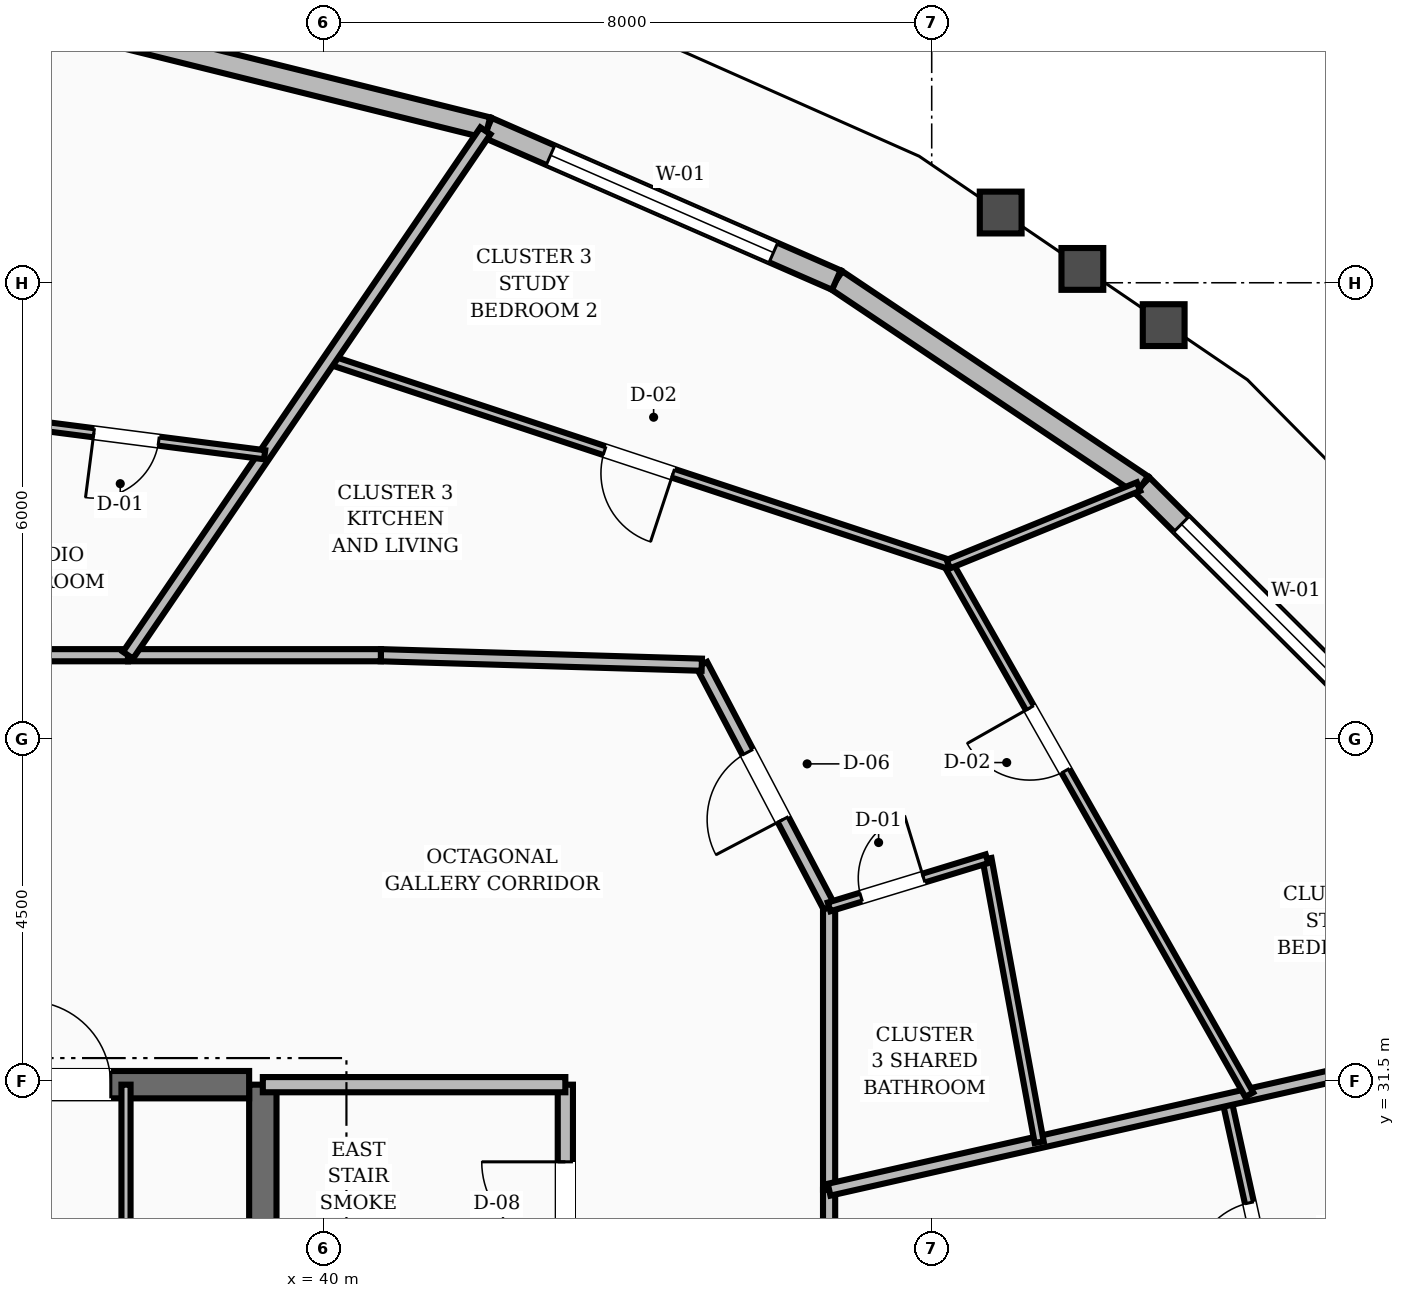
"""IFC4 building model, lengths in metres.
Left out: names, types, materials, properties, quantities, classifications, styles, units other than length and angle.
Written with IfcOpenShell. Run it as: python <this file> out.ifc"""

import sys

from ifc_helpers import new_model, si_unit, direction, frame, frame_2d, origin, place, context, subcontext, project, spatial, rectangle, extrude, element, fill, save


model = new_model("IFC4")
c1 = context("Model", 3, precision=1e-05, world=origin(), true_north=direction((0.0, 1.0)))
c2 = subcontext(c1, "Body", "Model", "MODEL_VIEW")
j1 = project(units=[si_unit("LENGTHUNIT", "METRE"), si_unit("PLANEANGLEUNIT", "RADIAN")], contexts=[c1])
p1 = place(None, origin())
s1 = spatial("IfcSite", under=j1, at=p1, CompositionType="ELEMENT")
p2 = place(p1, origin())
s2 = spatial("IfcBuilding", under=s1, at=p2, CompositionType="ELEMENT")
p3 = place(p2, frame((0.0, 0.0, 135.2)))
s3 = spatial("IfcBuildingStorey", under=s2, at=p3, CompositionType="ELEMENT", Elevation=135.2)
p4 = place(p3, frame((39.2, 25.15, 0.0), z_axis=(0.0, 0.0, 1.0), x_axis=(0.0, 1.0, 0.0)))
e1 = element("IfcWall", 1, at=p4, inside=s3, PredefinedType="SHEAR", context=c2, shape_type="SweptSolid", body=[
    extrude(rectangle(XDim=6.3, YDim=0.36, at=frame_2d((3.15, 0.0))), origin(), (0.0, 0.0, 1.0), 3.6),
])
p5 = place(p3, frame((35.8, 31.45, 0.0), z_axis=(0.0, 0.0, 1.0), x_axis=(1.0, 0.0, 0.0)))
e2 = element("IfcWall", 2, at=p5, inside=s3, PredefinedType="SHEAR", context=c2, shape_type="SweptSolid", body=[
    extrude(rectangle(XDim=3.22, YDim=0.36, at=frame_2d((1.61, 0.0))), origin(), (0.0, 0.0, 1.0), 3.6),
])
p6 = place(p5, frame((0.3, 0.0, 0.0)))
e3 = element("IfcOpeningElement", 3, at=p6, cuts=e2, PredefinedType="OPENING", context=c2, shape_type="SweptSolid", body=[
    extrude(rectangle(XDim=1.1, YDim=2.1, at=frame_2d((0.55, 1.05))), frame((0.0, 0.19, 0.0), z_axis=(0.0, -1.0, 0.0), x_axis=(1.0, 0.0, 0.0)), (0.0, 0.0, 1.0), 0.38),
])
p7 = place(p3, frame((54.068, 36.051, 0.0), z_axis=(0.0, 0.0, 1.0), x_axis=(-0.708572716766, 0.705637800188, 0.0)))
e4 = element("IfcWall", 4, at=p7, inside=s3, PredefinedType="STANDARD", context=c2, shape_type="SweptSolid", body=[
    extrude(rectangle(XDim=4.658, YDim=0.28, at=frame_2d((2.329, 0.0))), origin(), (0.0, 0.0, 1.0), 2.82),
])
p8 = place(p7, frame((0.729, 0.0, 0.8)))
e5 = element("IfcOpeningElement", 5, at=p8, cuts=e4, PredefinedType="OPENING", context=c2, shape_type="SweptSolid", body=[
    extrude(rectangle(XDim=3.2, YDim=1.65, at=frame_2d((1.6, 0.825))), frame((0.0, 0.15, 0.0), z_axis=(0.0, -1.0, 0.0), x_axis=(1.0, 0.0, 0.0)), (0.0, 0.0, 1.0), 0.3),
])
p9 = place(p3, frame((50.768, 39.338, 0.0), z_axis=(0.0, 0.0, 1.0), x_axis=(-0.830503660309, 0.557013168797, 0.0)))
e6 = element("IfcWall", 6, at=p9, inside=s3, PredefinedType="STANDARD", context=c2, shape_type="SweptSolid", body=[
    extrude(rectangle(XDim=4.843, YDim=0.28, at=frame_2d((2.421, 0.0))), origin(), (0.0, 0.0, 1.0), 2.82),
])
p10 = place(p3, frame((46.746, 42.035, 0.0), z_axis=(0.0, 0.0, 1.0), x_axis=(-0.916386582237, 0.400294431507, 0.0)))
e7 = element("IfcWall", 7, at=p10, inside=s3, PredefinedType="STANDARD", context=c2, shape_type="SweptSolid", body=[
    extrude(rectangle(XDim=5.007, YDim=0.28, at=frame_2d((2.504, 0.0))), origin(), (0.0, 0.0, 1.0), 2.82),
])
p11 = place(p10, frame((0.904, 0.0, 0.8)))
e8 = element("IfcOpeningElement", 8, at=p11, cuts=e7, PredefinedType="OPENING", context=c2, shape_type="SweptSolid", body=[
    extrude(rectangle(XDim=3.2, YDim=1.65, at=frame_2d((1.6, 0.825))), frame((0.0, 0.15, 0.0), z_axis=(0.0, -1.0, 0.0), x_axis=(1.0, 0.0, 0.0)), (0.0, 0.0, 1.0), 0.3),
])
p12 = place(p3, frame((42.157, 44.04, 0.0), z_axis=(0.0, 0.0, 1.0), x_axis=(-0.970616564694, 0.240631428415, 0.0)))
e9 = element("IfcWall", 9, at=p12, inside=s3, PredefinedType="STANDARD", context=c2, shape_type="SweptSolid", body=[
    extrude(rectangle(XDim=5.13, YDim=0.28, at=frame_2d((2.565, 0.0))), origin(), (0.0, 0.0, 1.0), 2.82),
])
p13 = place(p3, frame((43.18, 28.32, 0.0), z_axis=(0.0, 0.0, 1.0), x_axis=(0.0, 1.0, 0.0)))
e10 = element("IfcWall", 10, at=p13, inside=s3, PredefinedType="SOLIDWALL", context=c2, shape_type="SweptSolid", body=[
    extrude(rectangle(XDim=3.13, YDim=0.2, at=frame_2d((1.565, 0.0))), origin(), (0.0, 0.0, 1.0), 2.8),
])
p14 = place(p13, frame((1.015, 0.0, 0.0)))
e11 = element("IfcOpeningElement", 11, at=p14, cuts=e10, PredefinedType="OPENING", context=c2, shape_type="SweptSolid", body=[
    extrude(rectangle(XDim=1.1, YDim=2.1, at=frame_2d((0.55, 1.05))), frame((0.0, 0.11, 0.0), z_axis=(0.0, -1.0, 0.0), x_axis=(1.0, 0.0, 0.0)), (0.0, 0.0, 1.0), 0.22),
])
p15 = place(p3, frame((39.2, 31.45, 0.0), z_axis=(0.0, 0.0, 1.0), x_axis=(1.0, 0.0, 0.0)))
e12 = element("IfcWall", 12, at=p15, inside=s3, PredefinedType="SOLIDWALL", context=c2, shape_type="SweptSolid", body=[
    extrude(rectangle(XDim=3.98, YDim=0.2, at=frame_2d((1.99, 0.0))), origin(), (0.0, 0.0, 1.0), 2.8),
])
p16 = place(p3, frame((37.4, 25.25, 0.0), z_axis=(0.0, 0.0, 1.0), x_axis=(0.0, 1.0, 0.0)))
e13 = element("IfcWall", 13, at=p16, inside=s3, PredefinedType="PARTITIONING", context=c2, shape_type="SweptSolid", body=[
    extrude(rectangle(XDim=6.2, YDim=0.12, at=frame_2d((3.1, 0.0))), origin(), (0.0, 0.0, 1.0), 2.8),
])
p17 = place(p16, frame((2.625, 0.0, 0.0)))
e14 = element("IfcOpeningElement", 14, at=p17, cuts=e13, PredefinedType="OPENING", context=c2, shape_type="SweptSolid", body=[
    extrude(rectangle(XDim=0.95, YDim=2.1, at=frame_2d((0.475, 1.05))), frame((0.0, 0.07, 0.0), z_axis=(0.0, -1.0, 0.0), x_axis=(1.0, 0.0, 0.0)), (0.0, 0.0, 1.0), 0.14),
])
p18 = place(p3, frame((46.65, 26.914, 0.0), z_axis=(0.0, 0.0, 1.0), x_axis=(0.0, 1.0, 0.0)))
e15 = element("IfcWall", 15, at=p18, inside=s3, PredefinedType="SOLIDWALL", context=c2, shape_type="SweptSolid", body=[
    extrude(rectangle(XDim=3.154, YDim=0.16, at=frame_2d((1.577, 0.0))), origin(), (0.0, 0.0, 1.0), 2.8),
])
p19 = place(p3, frame((46.65, 30.068, 0.0), z_axis=(0.0, 0.0, 1.0), x_axis=(0.0, 1.0, 0.0)))
e16 = element("IfcWall", 16, at=p19, inside=s3, PredefinedType="SOLIDWALL", context=c2, shape_type="SweptSolid", body=[
    extrude(rectangle(XDim=3.721, YDim=0.16, at=frame_2d((1.86, 0.0))), origin(), (0.0, 0.0, 1.0), 2.8),
])
p20 = place(p3, frame((46.65, 33.789, 0.0), z_axis=(0.0, 0.0, 1.0), x_axis=(-0.46527115782, 0.885168204185, 0.0)))
e17 = element("IfcWall", 17, at=p20, inside=s3, PredefinedType="SOLIDWALL", context=c2, shape_type="SweptSolid", body=[
    extrude(rectangle(XDim=3.6, YDim=0.16, at=frame_2d((1.8, 0.0))), origin(), (0.0, 0.0, 1.0), 2.8),
])
p21 = place(p20, frame((1.3, 0.0, 0.0)))
e18 = element("IfcOpeningElement", 18, at=p21, cuts=e17, PredefinedType="OPENING", context=c2, shape_type="SweptSolid", body=[
    extrude(rectangle(XDim=1.0, YDim=2.1, at=frame_2d((0.5, 1.05))), frame((0.0, 0.09, 0.0), z_axis=(0.0, -1.0, 0.0), x_axis=(1.0, 0.0, 0.0)), (0.0, 0.0, 1.0), 0.18),
])
p22 = place(p3, frame((44.975, 36.975, 0.0), z_axis=(0.0, 0.0, 1.0), x_axis=(-0.999561990195, 0.029594387265, 0.0)))
e19 = element("IfcWall", 19, at=p22, inside=s3, PredefinedType="SOLIDWALL", context=c2, shape_type="SweptSolid", body=[
    extrude(rectangle(XDim=4.224, YDim=0.16, at=frame_2d((2.112, 0.0))), origin(), (0.0, 0.0, 1.0), 2.8),
])
p23 = place(p3, frame((40.753, 37.1, 0.0), z_axis=(0.0, 0.0, 1.0), x_axis=(-1.0, 0.0, 0.0)))
e20 = element("IfcWall", 20, at=p23, inside=s3, PredefinedType="SOLIDWALL", context=c2, shape_type="SweptSolid", body=[
    extrude(rectangle(XDim=3.327, YDim=0.16, at=frame_2d((1.664, 0.0))), origin(), (0.0, 0.0, 1.0), 2.8),
])
p24 = place(p3, frame((37.426, 37.1, 0.0), z_axis=(0.0, 0.0, 1.0), x_axis=(-1.0, 0.0, 0.0)))
e21 = element("IfcWall", 21, at=p24, inside=s3, PredefinedType="SOLIDWALL", context=c2, shape_type="SweptSolid", body=[
    extrude(rectangle(XDim=2.821, YDim=0.16, at=frame_2d((1.41, 0.0))), origin(), (0.0, 0.0, 1.0), 2.8),
])
p25 = place(p3, frame((52.682, 27.612, 0.0), z_axis=(0.0, 0.0, 1.0), x_axis=(-0.214841783998, 0.976648866199, 0.0)))
e22 = element("IfcWall", 22, at=p25, inside=s3, PredefinedType="PARTITIONING", context=c2, shape_type="SweptSolid", body=[
    extrude(rectangle(XDim=3.726, YDim=0.12, at=frame_2d((1.863, 0.0))), origin(), (0.0, 0.0, 1.0), 2.8),
])
p26 = place(p25, frame((1.388, 0.0, 0.0)))
e23 = element("IfcOpeningElement", 23, at=p26, cuts=e22, PredefinedType="OPENING", context=c2, shape_type="SweptSolid", body=[
    extrude(rectangle(XDim=0.95, YDim=2.1, at=frame_2d((0.475, 1.05))), frame((0.0, 0.07, 0.0), z_axis=(0.0, -1.0, 0.0), x_axis=(1.0, 0.0, 0.0)), (0.0, 0.0, 1.0), 0.14),
])
p27 = place(p3, frame((46.65, 30.068, 0.0), z_axis=(0.0, 0.0, 1.0), x_axis=(0.975360958505, 0.220615050765, 0.0)))
e24 = element("IfcWall", 24, at=p27, inside=s3, PredefinedType="SOLIDWALL", context=c2, shape_type="SweptSolid", body=[
    extrude(rectangle(XDim=10.07, YDim=0.16, at=frame_2d((5.035, 0.0))), origin(), (0.0, 0.0, 1.0), 2.8),
])
p28 = place(p3, frame((49.414, 30.693, 0.0), z_axis=(0.0, 0.0, 1.0), x_axis=(-0.181134567916, 0.983458320574, 0.0)))
e25 = element("IfcWall", 25, at=p28, inside=s3, PredefinedType="PARTITIONING", context=c2, shape_type="SweptSolid", body=[
    extrude(rectangle(XDim=3.792, YDim=0.12, at=frame_2d((1.896, 0.0))), origin(), (0.0, 0.0, 1.0), 2.8),
])
p29 = place(p3, frame((46.65, 33.789, 0.0), z_axis=(0.0, 0.0, 1.0), x_axis=(0.956529436115, 0.291635796578, 0.0)))
e26 = element("IfcWall", 26, at=p29, inside=s3, PredefinedType="PARTITIONING", context=c2, shape_type="SweptSolid", body=[
    extrude(rectangle(XDim=2.172, YDim=0.12, at=frame_2d((1.086, 0.0))), origin(), (0.0, 0.0, 1.0), 2.8),
])
p30 = place(p29, frame((0.44, 0.0, 0.0)))
e27 = element("IfcOpeningElement", 27, at=p30, cuts=e26, PredefinedType="OPENING", context=c2, shape_type="SweptSolid", body=[
    extrude(rectangle(XDim=0.86, YDim=2.1, at=frame_2d((0.43, 1.05))), frame((0.0, 0.07, 0.0), z_axis=(0.0, -1.0, 0.0), x_axis=(1.0, 0.0, 0.0)), (0.0, 0.0, 1.0), 0.14),
])
p31 = place(p3, frame((52.178, 31.318, 0.0), z_axis=(0.0, 0.0, 1.0), x_axis=(-0.493371027673, 0.869818963378, 0.0)))
e28 = element("IfcWall", 28, at=p31, inside=s3, PredefinedType="PARTITIONING", context=c2, shape_type="SweptSolid", body=[
    extrude(rectangle(XDim=8.024, YDim=0.12, at=frame_2d((4.012, 0.0))), origin(), (0.0, 0.0, 1.0), 2.8),
])
p32 = place(p31, frame((4.9, 0.0, 0.0)))
e29 = element("IfcOpeningElement", 29, at=p32, cuts=e28, PredefinedType="OPENING", context=c2, shape_type="SweptSolid", body=[
    extrude(rectangle(XDim=0.95, YDim=2.1, at=frame_2d((0.475, 1.05))), frame((0.0, 0.07, 0.0), z_axis=(0.0, -1.0, 0.0), x_axis=(1.0, 0.0, 0.0)), (0.0, 0.0, 1.0), 0.14),
])
p33 = place(p3, frame((48.219, 38.298, 0.0), z_axis=(0.0, 0.0, 1.0), x_axis=(-0.949596025741, 0.313476295591, 0.0)))
e30 = element("IfcWall", 30, at=p33, inside=s3, PredefinedType="PARTITIONING", context=c2, shape_type="SweptSolid", body=[
    extrude(rectangle(XDim=8.575, YDim=0.12, at=frame_2d((4.288, 0.0))), origin(), (0.0, 0.0, 1.0), 2.8),
])
p34 = place(p33, frame((3.813, 0.0, 0.0)))
e31 = element("IfcOpeningElement", 31, at=p34, cuts=e30, PredefinedType="OPENING", context=c2, shape_type="SweptSolid", body=[
    extrude(rectangle(XDim=0.95, YDim=2.1, at=frame_2d((0.475, 1.05))), frame((0.0, 0.07, 0.0), z_axis=(0.0, -1.0, 0.0), x_axis=(1.0, 0.0, 0.0)), (0.0, 0.0, 1.0), 0.14),
])
p35 = place(p3, frame((48.219, 38.298, 0.0), z_axis=(0.0, 0.0, 1.0), x_axis=(0.925932117974, 0.377689969293, 0.0)))
e32 = element("IfcWall", 32, at=p35, inside=s3, PredefinedType="PARTITIONING", context=c2, shape_type="SweptSolid", body=[
    extrude(rectangle(XDim=2.703, YDim=0.12, at=frame_2d((1.351, 0.0))), origin(), (0.0, 0.0, 1.0), 2.8),
])
p36 = place(p3, frame((37.426, 37.1, 0.0), z_axis=(0.0, 0.0, 1.0), x_axis=(0.563247896503, 0.826287968619, 0.0)))
e33 = element("IfcWall", 33, at=p36, inside=s3, PredefinedType="SOLIDWALL", context=c2, shape_type="SweptSolid", body=[
    extrude(rectangle(XDim=8.349, YDim=0.16, at=frame_2d((4.174, 0.0))), origin(), (0.0, 0.0, 1.0), 2.8),
])
p37 = place(p3, frame((39.224, 39.737, 0.0), z_axis=(0.0, 0.0, 1.0), x_axis=(-0.991795828826, 0.127832053581, 0.0)))
e34 = element("IfcWall", 34, at=p37, inside=s3, PredefinedType="PARTITIONING", context=c2, shape_type="SweptSolid", body=[
    extrude(rectangle(XDim=3.671, YDim=0.12, at=frame_2d((1.835, 0.0))), origin(), (0.0, 0.0, 1.0), 2.8),
])
p38 = place(p37, frame((1.406, 0.0, 0.0)))
e35 = element("IfcOpeningElement", 35, at=p38, cuts=e34, PredefinedType="OPENING", context=c2, shape_type="SweptSolid", body=[
    extrude(rectangle(XDim=0.86, YDim=2.1, at=frame_2d((0.43, 1.05))), frame((0.0, 0.07, 0.0), z_axis=(0.0, -1.0, 0.0), x_axis=(1.0, 0.0, 0.0)), (0.0, 0.0, 1.0), 0.14),
])
p39 = place(p8, origin())
e36 = element("IfcWindow", 36, at=p39, inside=s3, PartitioningType="SINGLE_PANEL", PredefinedType="WINDOW", context=c2, shape_type="SweptSolid", body=[
    extrude(rectangle(XDim=3.2, YDim=1.65, at=frame_2d((1.6, 0.825))), frame((0.0, 0.03, 0.0), z_axis=(0.0, -1.0, 0.0), x_axis=(1.0, 0.0, 0.0)), (0.0, 0.0, 1.0), 0.06),
])
fill(e5, e36)
p40 = place(p11, origin())
e37 = element("IfcWindow", 37, at=p40, inside=s3, PartitioningType="SINGLE_PANEL", PredefinedType="WINDOW", context=c2, shape_type="SweptSolid", body=[
    extrude(rectangle(XDim=3.2, YDim=1.65, at=frame_2d((1.6, 0.825))), frame((0.0, 0.03, 0.0), z_axis=(0.0, -1.0, 0.0), x_axis=(1.0, 0.0, 0.0)), (0.0, 0.0, 1.0), 0.06),
])
fill(e8, e37)
p41 = place(p14, origin())
e38 = element("IfcDoor", 38, at=p41, inside=s3, OperationType="SINGLE_SWING_RIGHT", PredefinedType="DOOR", context=c2, shape_type="SweptSolid", body=[
    extrude(rectangle(XDim=1.1, YDim=2.1, at=frame_2d((0.55, 1.05))), frame((0.0, 0.025, 0.0), z_axis=(0.0, -1.0, 0.0), x_axis=(1.0, 0.0, 0.0)), (0.0, 0.0, 1.0), 0.05),
])
fill(e11, e38)
p42 = place(p6, origin())
e39 = element("IfcDoor", 39, at=p42, inside=s3, OperationType="SINGLE_SWING_LEFT", PredefinedType="DOOR", context=c2, shape_type="SweptSolid", body=[
    extrude(rectangle(XDim=1.1, YDim=2.1, at=frame_2d((0.55, 1.05))), frame((0.0, 0.025, 0.0), z_axis=(0.0, -1.0, 0.0), x_axis=(1.0, 0.0, 0.0)), (0.0, 0.0, 1.0), 0.05),
])
fill(e3, e39)
p43 = place(p26, origin())
e40 = element("IfcDoor", 40, at=p43, inside=s3, OperationType="SINGLE_SWING_LEFT", PredefinedType="DOOR", context=c2, shape_type="SweptSolid", body=[
    extrude(rectangle(XDim=0.95, YDim=2.1, at=frame_2d((0.475, 1.05))), frame((0.0, 0.025, 0.0), z_axis=(0.0, -1.0, 0.0), x_axis=(1.0, 0.0, 0.0)), (0.0, 0.0, 1.0), 0.05),
])
fill(e23, e40)
p44 = place(p30, origin())
e41 = element("IfcDoor", 41, at=p44, inside=s3, OperationType="SINGLE_SWING_RIGHT", PredefinedType="DOOR", context=c2, shape_type="SweptSolid", body=[
    extrude(rectangle(XDim=0.86, YDim=2.1, at=frame_2d((0.43, 1.05))), frame((0.0, 0.025, 0.0), z_axis=(0.0, -1.0, 0.0), x_axis=(1.0, 0.0, 0.0)), (0.0, 0.0, 1.0), 0.05),
])
fill(e27, e41)
p45 = place(p21, origin())
e42 = element("IfcDoor", 42, at=p45, inside=s3, OperationType="SINGLE_SWING_LEFT", PredefinedType="DOOR", context=c2, shape_type="SweptSolid", body=[
    extrude(rectangle(XDim=1.0, YDim=2.1, at=frame_2d((0.5, 1.05))), frame((0.0, 0.025, 0.0), z_axis=(0.0, -1.0, 0.0), x_axis=(1.0, 0.0, 0.0)), (0.0, 0.0, 1.0), 0.05),
])
fill(e18, e42)
p46 = place(p32, origin())
e43 = element("IfcDoor", 43, at=p46, inside=s3, OperationType="SINGLE_SWING_RIGHT", PredefinedType="DOOR", context=c2, shape_type="SweptSolid", body=[
    extrude(rectangle(XDim=0.95, YDim=2.1, at=frame_2d((0.475, 1.05))), frame((0.0, 0.025, 0.0), z_axis=(0.0, -1.0, 0.0), x_axis=(1.0, 0.0, 0.0)), (0.0, 0.0, 1.0), 0.05),
])
fill(e29, e43)
p47 = place(p34, origin())
e44 = element("IfcDoor", 44, at=p47, inside=s3, OperationType="SINGLE_SWING_LEFT", PredefinedType="DOOR", context=c2, shape_type="SweptSolid", body=[
    extrude(rectangle(XDim=0.95, YDim=2.1, at=frame_2d((0.475, 1.05))), frame((0.0, 0.025, 0.0), z_axis=(0.0, -1.0, 0.0), x_axis=(1.0, 0.0, 0.0)), (0.0, 0.0, 1.0), 0.05),
])
fill(e31, e44)
p48 = place(p38, origin())
e45 = element("IfcDoor", 45, at=p48, inside=s3, OperationType="SINGLE_SWING_RIGHT", PredefinedType="DOOR", context=c2, shape_type="SweptSolid", body=[
    extrude(rectangle(XDim=0.86, YDim=2.1, at=frame_2d((0.43, 1.05))), frame((0.0, 0.025, 0.0), z_axis=(0.0, -1.0, 0.0), x_axis=(1.0, 0.0, 0.0)), (0.0, 0.0, 1.0), 0.05),
])
fill(e35, e45)
save(model, sys.argv[1])
